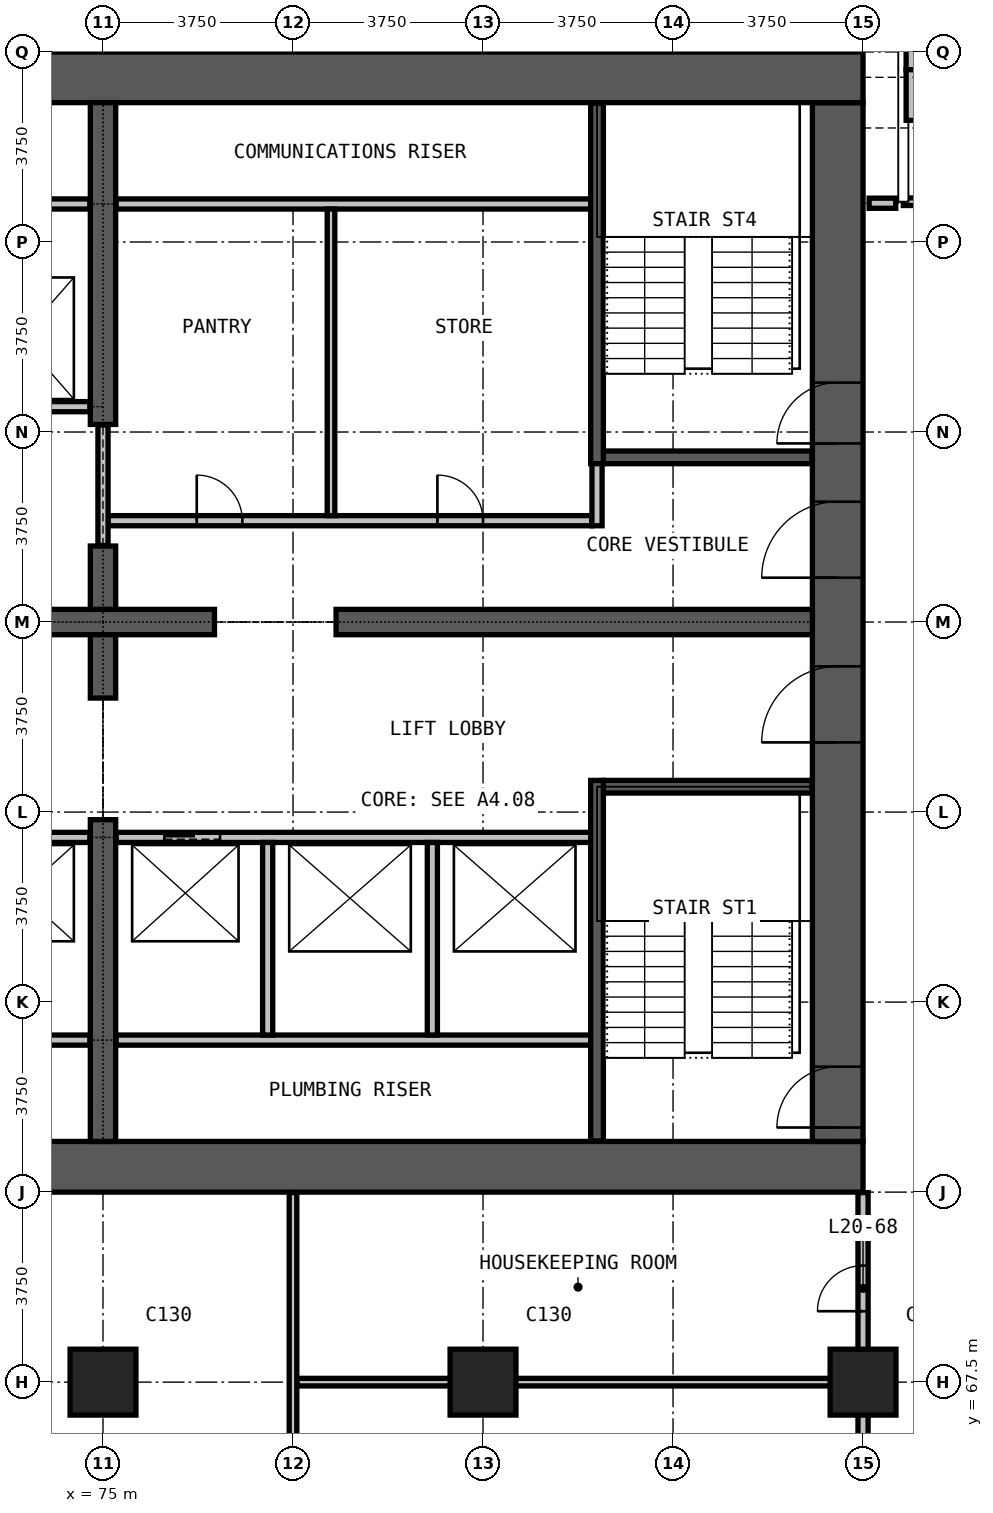
"""IFC4 building model, lengths in metres.
Left out: names, types, materials, properties, quantities, classifications, styles, units other than length and angle.
Written with IfcOpenShell. Run it as: python <this file> out.ifc"""

import sys

from ifc_helpers import new_model, si_unit, direction, frame, frame_2d, origin, origin_2d, place, context, subcontext, project, spatial, rectangle, extrude, element, fill, save


model = new_model("IFC4")
c1 = context("Model", 3, precision=1e-05, world=origin(), true_north=direction((0.0, 1.0)))
c2 = subcontext(c1, "Body", "Model", "MODEL_VIEW")
j1 = project(units=[si_unit("LENGTHUNIT", "METRE"), si_unit("PLANEANGLEUNIT", "RADIAN")], contexts=[c1])
p1 = place(None, origin())
s1 = spatial("IfcSite", under=j1, at=p1, CompositionType="ELEMENT")
p2 = place(p1, origin())
s2 = spatial("IfcBuilding", under=s1, at=p2, CompositionType="ELEMENT")
p3 = place(p2, frame((0.0, 0.0, 85.7)))
s3 = spatial("IfcBuildingStorey", under=s2, at=p3, CompositionType="ELEMENT", Elevation=85.7)
for number, where, z_axis, x_axis in (
    (1, (75.0, 67.5, 0.0), (0.0, 0.0, 1.0), (1.0, 0.0, 0.0)),
    (2, (82.5, 67.5, 0.0), (0.0, 0.0, 1.0), (1.0, 0.0, 0.0)),
    (3, (90.0, 67.5, 0.0), (0.0, 0.0, 1.0), (1.0, 0.0, 0.0)),
):
    element("IfcColumn", number, at=place(p3, frame(where, z_axis=z_axis, x_axis=x_axis)), inside=s3, PredefinedType="COLUMN", context=c2, shape_type="SweptSolid", body=[
        extrude(rectangle(XDim=1.3, YDim=1.3, at=origin_2d()), origin(), (0.0, 0.0, 1.0), 3.3),
    ])
p4 = place(p3, frame((60.0, 71.75, 0.0), z_axis=(0.0, 0.0, 1.0), x_axis=(1.0, 0.0, 0.0)))
e4 = element("IfcWall", 4, at=p4, inside=s3, PredefinedType="SHEAR", context=c2, shape_type="SweptSolid", body=[
    extrude(rectangle(XDim=30.0, YDim=1.0, at=frame_2d((15.0, 0.0))), origin(), (0.0, 0.0, 1.0), 3.3),
])
p5 = place(p3, frame((89.5, 72.25, 0.0), z_axis=(0.0, 0.0, 1.0), x_axis=(0.0, 1.0, 0.0)))
e5 = element("IfcWall", 5, at=p5, inside=s3, PredefinedType="SHEAR", context=c2, shape_type="SweptSolid", body=[
    extrude(rectangle(XDim=20.5, YDim=1.0, at=frame_2d((10.25, 0.0))), origin(), (0.0, 0.0, 1.0), 3.3),
])
p6 = place(p5, frame((0.275, 0.0, 0.0)))
e6 = element("IfcOpeningElement", 6, at=p6, cuts=e5, PredefinedType="OPENING", context=c2, shape_type="SweptSolid", body=[
    extrude(rectangle(XDim=1.2, YDim=2.2, at=frame_2d((0.6, 1.1))), frame((0.0, 0.51, 0.0), z_axis=(0.0, -1.0, 0.0), x_axis=(1.0, 0.0, 0.0)), (0.0, 0.0, 1.0), 1.02),
])
p7 = place(p5, frame((13.775, 0.0, 0.0)))
e7 = element("IfcOpeningElement", 7, at=p7, cuts=e5, PredefinedType="OPENING", context=c2, shape_type="SweptSolid", body=[
    extrude(rectangle(XDim=1.2, YDim=2.2, at=frame_2d((0.6, 1.1))), frame((0.0, 0.51, 0.0), z_axis=(0.0, -1.0, 0.0), x_axis=(1.0, 0.0, 0.0)), (0.0, 0.0, 1.0), 1.02),
])
p8 = place(p5, frame((7.875, 0.0, 0.0)))
e8 = element("IfcOpeningElement", 8, at=p8, cuts=e5, PredefinedType="OPENING", context=c2, shape_type="SweptSolid", body=[
    extrude(rectangle(XDim=1.5, YDim=2.2, at=frame_2d((0.75, 1.1))), frame((0.0, 0.51, 0.0), z_axis=(0.0, -1.0, 0.0), x_axis=(1.0, 0.0, 0.0)), (0.0, 0.0, 1.0), 1.02),
])
p9 = place(p5, frame((11.125, 0.0, 0.0)))
e9 = element("IfcOpeningElement", 9, at=p9, cuts=e5, PredefinedType="OPENING", context=c2, shape_type="SweptSolid", body=[
    extrude(rectangle(XDim=1.5, YDim=2.2, at=frame_2d((0.75, 1.1))), frame((0.0, 0.51, 0.0), z_axis=(0.0, -1.0, 0.0), x_axis=(1.0, 0.0, 0.0)), (0.0, 0.0, 1.0), 1.02),
])
p10 = place(p3, frame((90.0, 93.25, 0.0), z_axis=(0.0, 0.0, 1.0), x_axis=(-1.0, 0.0, 0.0)))
e10 = element("IfcWall", 10, at=p10, inside=s3, PredefinedType="SHEAR", context=c2, shape_type="SweptSolid", body=[
    extrude(rectangle(XDim=30.0, YDim=1.0, at=frame_2d((15.0, 0.0))), origin(), (0.0, 0.0, 1.0), 3.3),
])
p11 = place(p3, frame((72.8, 82.5, 0.0), z_axis=(0.0, 0.0, 1.0), x_axis=(1.0, 0.0, 0.0)))
e11 = element("IfcWall", 11, at=p11, inside=s3, PredefinedType="SHEAR", context=c2, shape_type="SweptSolid", body=[
    extrude(rectangle(XDim=4.4, YDim=0.5, at=frame_2d((2.2, 0.0))), origin(), (0.0, 0.0, 1.0), 3.3),
])
p12 = place(p3, frame((79.6, 82.5, 0.0), z_axis=(0.0, 0.0, 1.0), x_axis=(1.0, 0.0, 0.0)))
e12 = element("IfcWall", 12, at=p12, inside=s3, PredefinedType="SHEAR", context=c2, shape_type="SweptSolid", body=[
    extrude(rectangle(XDim=9.4, YDim=0.5, at=frame_2d((4.7, 0.0))), origin(), (0.0, 0.0, 1.0), 3.3),
])
p13 = place(p3, frame((75.0, 72.25, 0.0), z_axis=(0.0, 0.0, 1.0), x_axis=(0.0, 1.0, 0.0)))
e13 = element("IfcWall", 13, at=p13, inside=s3, PredefinedType="SHEAR", context=c2, shape_type="SweptSolid", body=[
    extrude(rectangle(XDim=6.35, YDim=0.5, at=frame_2d((3.175, 0.0))), origin(), (0.0, 0.0, 1.0), 3.3),
])
for number, where, z_axis, x_axis in (
    (14, (75.0, 81.0, 0.0), (0.0, 0.0, 1.0), (0.0, 1.0, 0.0)),
    (15, (75.0, 82.75, 0.0), (0.0, 0.0, 1.0), (0.0, 1.0, 0.0)),
):
    element("IfcWall", number, at=place(p3, frame(where, z_axis=z_axis, x_axis=x_axis)), inside=s3, PredefinedType="SHEAR", context=c2, shape_type="SweptSolid", body=[
        extrude(rectangle(XDim=1.25, YDim=0.5, at=frame_2d((0.625, 0.0))), origin(), (0.0, 0.0, 1.0), 3.3),
    ])
p14 = place(p3, frame((75.0, 86.4, 0.0), z_axis=(0.0, 0.0, 1.0), x_axis=(0.0, 1.0, 0.0)))
e16 = element("IfcWall", 16, at=p14, inside=s3, PredefinedType="SHEAR", context=c2, shape_type="SweptSolid", body=[
    extrude(rectangle(XDim=6.35, YDim=0.5, at=frame_2d((3.175, 0.0))), origin(), (0.0, 0.0, 1.0), 3.3),
])
p15 = place(p3, frame((90.795, 90.795, 0.0), z_axis=(0.0, 0.0, 1.0), x_axis=(1.0, 0.0, 0.0)))
e17 = element("IfcWall", 17, at=p15, inside=s3, PredefinedType="SOLIDWALL", context=c2, shape_type="SweptSolid", body=[
    extrude(rectangle(XDim=2.955, YDim=0.15, at=frame_2d((1.478, 0.0))), origin(), (0.0, 0.0, 1.0), 3.0),
])
p16 = place(p15, frame((0.877, 0.0, 0.0)))
e18 = element("IfcOpeningElement", 18, at=p16, cuts=e17, PredefinedType="OPENING", context=c2, shape_type="SweptSolid", body=[
    extrude(rectangle(XDim=1.2, YDim=2.4, at=frame_2d((0.6, 1.2))), frame((0.0, 0.085, 0.0), z_axis=(0.0, -1.0, 0.0), x_axis=(1.0, 0.0, 0.0)), (0.0, 0.0, 1.0), 0.17),
])
p17 = place(p3, frame((90.85, 93.625, 0.0), z_axis=(0.0, 0.0, 1.0), x_axis=(1.0, 0.0, 0.0)))
e19 = element("IfcWall", 19, at=p17, inside=s3, PredefinedType="USERDEFINED", context=c2, shape_type="SweptSolid", body=[
    extrude(rectangle(XDim=3.2, YDim=0.45, at=frame_2d((1.6, 0.0))), origin(), (0.0, 0.0, 1.0), 1.1),
])
p18 = place(p3, frame((91.075, 92.4, 0.0), z_axis=(0.0, 0.0, 1.0), x_axis=(0.0, 1.0, 0.0)))
e20 = element("IfcWall", 20, at=p18, inside=s3, PredefinedType="USERDEFINED", context=c2, shape_type="SweptSolid", body=[
    extrude(rectangle(XDim=1.0, YDim=0.45, at=frame_2d((0.5, 0.0))), origin(), (0.0, 0.0, 1.0), 1.1),
])
p19 = place(p3, frame((75.1, 84.5, 0.0), z_axis=(0.0, 0.0, 1.0), x_axis=(1.0, 0.0, 0.0)))
e21 = element("IfcWall", 21, at=p19, inside=s3, PredefinedType="PARTITIONING", context=c2, shape_type="SweptSolid", body=[
    extrude(rectangle(XDim=9.55, YDim=0.2, at=frame_2d((4.775, 0.0))), origin(), (0.0, 0.0, 1.0), 3.0),
])
p20 = place(p19, frame((1.75, 0.0, 0.0)))
e22 = element("IfcOpeningElement", 22, at=p20, cuts=e21, PredefinedType="OPENING", context=c2, shape_type="SweptSolid", body=[
    extrude(rectangle(XDim=0.9, YDim=2.2, at=frame_2d((0.45, 1.1))), frame((0.0, 0.11, 0.0), z_axis=(0.0, -1.0, 0.0), x_axis=(1.0, 0.0, 0.0)), (0.0, 0.0, 1.0), 0.22),
])
p21 = place(p19, frame((6.5, 0.0, 0.0)))
e23 = element("IfcOpeningElement", 23, at=p21, cuts=e21, PredefinedType="OPENING", context=c2, shape_type="SweptSolid", body=[
    extrude(rectangle(XDim=0.9, YDim=2.2, at=frame_2d((0.45, 1.1))), frame((0.0, 0.11, 0.0), z_axis=(0.0, -1.0, 0.0), x_axis=(1.0, 0.0, 0.0)), (0.0, 0.0, 1.0), 0.22),
])
p22 = place(p3, frame((75.26, 90.75, 0.0), z_axis=(0.0, 0.0, 1.0), x_axis=(1.0, 0.0, 0.0)))
e24 = element("IfcWall", 24, at=p22, inside=s3, PredefinedType="PARTITIONING", context=c2, shape_type="SweptSolid", body=[
    extrude(rectangle(XDim=9.365, YDim=0.2, at=frame_2d((4.683, 0.0))), origin(), (0.0, 0.0, 1.0), 3.0),
])
p23 = place(p3, frame((75.0, 84.01, 0.0), z_axis=(0.0, 0.0, 1.0), x_axis=(0.0, 1.0, 0.0)))
e25 = element("IfcWall", 25, at=p23, inside=s3, PredefinedType="PARTITIONING", context=c2, shape_type="SweptSolid", body=[
    extrude(rectangle(XDim=2.38, YDim=0.2, at=frame_2d((1.19, 0.0))), origin(), (0.0, 0.0, 1.0), 2.4),
])
p24 = place(p3, frame((84.75, 84.4, 0.0), z_axis=(0.0, 0.0, 1.0), x_axis=(0.0, 1.0, 0.0)))
e26 = element("IfcWall", 26, at=p24, inside=s3, PredefinedType="PARTITIONING", context=c2, shape_type="SweptSolid", body=[
    extrude(rectangle(XDim=1.475, YDim=0.2, at=frame_2d((0.738, 0.0))), origin(), (0.0, 0.0, 1.0), 3.0),
])
p25 = place(p3, frame((90.12, 90.765, 0.0), z_axis=(0.0, 0.0, 1.0), x_axis=(1.0, 0.0, 0.0)))
e27 = element("IfcWall", 27, at=p25, inside=s3, PredefinedType="PARTITIONING", context=c2, shape_type="SweptSolid", body=[
    extrude(rectangle(XDim=0.525, YDim=0.2, at=frame_2d((0.262, 0.0))), origin(), (0.0, 0.0, 1.0), 3.0),
])
p26 = place(p3, frame((90.0, 52.4, 0.0), z_axis=(0.0, 0.0, 1.0), x_axis=(0.0, 1.0, 0.0)))
e28 = element("IfcWall", 28, at=p26, inside=s3, PredefinedType="PARTITIONING", context=c2, shape_type="SweptSolid", body=[
    extrude(rectangle(XDim=18.84, YDim=0.2, at=frame_2d((9.42, 0.0))), origin(), (0.0, 0.0, 1.0), 3.0),
])
p27 = place(p26, frame((10.85, 0.0, 0.0)))
e29 = element("IfcOpeningElement", 29, at=p27, cuts=e28, PredefinedType="OPENING", context=c2, shape_type="SweptSolid", body=[
    extrude(rectangle(XDim=1.0, YDim=2.2, at=frame_2d((0.5, 1.1))), frame((0.0, 0.11, 0.0), z_axis=(0.0, -1.0, 0.0), x_axis=(1.0, 0.0, 0.0)), (0.0, 0.0, 1.0), 0.22),
])
p28 = place(p26, frame((16.5, 0.0, 0.0)))
e30 = element("IfcOpeningElement", 30, at=p28, cuts=e28, PredefinedType="OPENING", context=c2, shape_type="SweptSolid", body=[
    extrude(rectangle(XDim=0.9, YDim=2.2, at=frame_2d((0.45, 1.1))), frame((0.0, 0.11, 0.0), z_axis=(0.0, -1.0, 0.0), x_axis=(1.0, 0.0, 0.0)), (0.0, 0.0, 1.0), 0.22),
])
p29 = place(p3, frame((78.825, 67.5, 0.0), z_axis=(0.0, 0.0, 1.0), x_axis=(1.0, 0.0, 0.0)))
e31 = element("IfcWall", 31, at=p29, inside=s3, PredefinedType="PARTITIONING", context=c2, shape_type="SweptSolid", body=[
    extrude(rectangle(XDim=11.075, YDim=0.15, at=frame_2d((5.538, 0.0))), origin(), (0.0, 0.0, 1.0), 3.0),
])
p30 = place(p3, frame((78.75, 52.6, 0.0), z_axis=(0.0, 0.0, 1.0), x_axis=(0.0, 1.0, 0.0)))
e32 = element("IfcWall", 32, at=p30, inside=s3, PredefinedType="PARTITIONING", context=c2, shape_type="SweptSolid", body=[
    extrude(rectangle(XDim=18.64, YDim=0.15, at=frame_2d((9.32, 0.0))), origin(), (0.0, 0.0, 1.0), 3.0),
])
p31 = place(p3, frame((79.5, 84.6, 0.0), z_axis=(0.0, 0.0, 1.0), x_axis=(0.0, 1.0, 0.0)))
e33 = element("IfcWall", 33, at=p31, inside=s3, PredefinedType="PARTITIONING", context=c2, shape_type="SweptSolid", body=[
    extrude(rectangle(XDim=6.05, YDim=0.15, at=frame_2d((3.025, 0.0))), origin(), (0.0, 0.0, 1.0), 3.0),
])
for number, where, z_axis, x_axis in (
    (34, (65.375, 74.25, 0.0), (0.0, 0.0, 1.0), (1.0, 0.0, 0.0)),
    (35, (75.26, 74.25, 0.0), (0.0, 0.0, 1.0), (1.0, 0.0, 0.0)),
):
    element("IfcWall", number, at=place(p3, frame(where, z_axis=z_axis, x_axis=x_axis)), inside=s3, PredefinedType="PARTITIONING", context=c2, shape_type="SweptSolid", body=[
        extrude(rectangle(XDim=9.365, YDim=0.2, at=frame_2d((4.683, 0.0))), origin(), (0.0, 0.0, 1.0), 3.0),
    ])
p32 = place(p3, frame((65.375, 78.25, 0.0), z_axis=(0.0, 0.0, 1.0), x_axis=(1.0, 0.0, 0.0)))
e36 = element("IfcWall", 36, at=p32, inside=s3, PredefinedType="PARTITIONING", context=c2, shape_type="SweptSolid", body=[
    extrude(rectangle(XDim=9.365, YDim=0.2, at=frame_2d((4.683, 0.0))), origin(), (0.0, 0.0, 1.0), 3.0),
])
p33 = place(p32, frame((1.0, 0.0, 0.0)))
e37 = element("IfcOpeningElement", 37, at=p33, cuts=e36, PredefinedType="OPENING", context=c2, shape_type="SweptSolid", body=[
    extrude(rectangle(XDim=1.1, YDim=2.2, at=frame_2d((0.55, 1.1))), frame((0.0, 0.11, 0.0), z_axis=(0.0, -1.0, 0.0), x_axis=(1.0, 0.0, 0.0)), (0.0, 0.0, 1.0), 0.22),
])
p34 = place(p32, frame((4.175, 0.0, 0.0)))
e38 = element("IfcOpeningElement", 38, at=p34, cuts=e36, PredefinedType="OPENING", context=c2, shape_type="SweptSolid", body=[
    extrude(rectangle(XDim=1.1, YDim=2.2, at=frame_2d((0.55, 1.1))), frame((0.0, 0.11, 0.0), z_axis=(0.0, -1.0, 0.0), x_axis=(1.0, 0.0, 0.0)), (0.0, 0.0, 1.0), 0.22),
])
p35 = place(p32, frame((7.325, 0.0, 0.0)))
e39 = element("IfcOpeningElement", 39, at=p35, cuts=e36, PredefinedType="OPENING", context=c2, shape_type="SweptSolid", body=[
    extrude(rectangle(XDim=1.1, YDim=2.2, at=frame_2d((0.55, 1.1))), frame((0.0, 0.11, 0.0), z_axis=(0.0, -1.0, 0.0), x_axis=(1.0, 0.0, 0.0)), (0.0, 0.0, 1.0), 0.22),
])
p36 = place(p3, frame((75.26, 78.25, 0.0), z_axis=(0.0, 0.0, 1.0), x_axis=(1.0, 0.0, 0.0)))
e40 = element("IfcWall", 40, at=p36, inside=s3, PredefinedType="PARTITIONING", context=c2, shape_type="SweptSolid", body=[
    extrude(rectangle(XDim=9.365, YDim=0.2, at=frame_2d((4.683, 0.0))), origin(), (0.0, 0.0, 1.0), 3.0),
])
p37 = place(p36, frame((0.95, 0.0, 0.0)))
e41 = element("IfcOpeningElement", 41, at=p37, cuts=e40, PredefinedType="OPENING", context=c2, shape_type="SweptSolid", body=[
    extrude(rectangle(XDim=1.1, YDim=2.2, at=frame_2d((0.55, 1.1))), frame((0.0, 0.11, 0.0), z_axis=(0.0, -1.0, 0.0), x_axis=(1.0, 0.0, 0.0)), (0.0, 0.0, 1.0), 0.22),
])
p38 = place(p3, frame((65.375, 86.75, 0.0), z_axis=(0.0, 0.0, 1.0), x_axis=(1.0, 0.0, 0.0)))
e42 = element("IfcWall", 42, at=p38, inside=s3, PredefinedType="PARTITIONING", context=c2, shape_type="SweptSolid", body=[
    extrude(rectangle(XDim=9.365, YDim=0.2, at=frame_2d((4.683, 0.0))), origin(), (0.0, 0.0, 1.0), 3.0),
])
p39 = place(p38, frame((1.0, 0.0, 0.0)))
e43 = element("IfcOpeningElement", 43, at=p39, cuts=e42, PredefinedType="OPENING", context=c2, shape_type="SweptSolid", body=[
    extrude(rectangle(XDim=1.1, YDim=2.2, at=frame_2d((0.55, 1.1))), frame((0.0, 0.11, 0.0), z_axis=(0.0, -1.0, 0.0), x_axis=(1.0, 0.0, 0.0)), (0.0, 0.0, 1.0), 0.22),
])
p40 = place(p38, frame((4.175, 0.0, 0.0)))
e44 = element("IfcOpeningElement", 44, at=p40, cuts=e42, PredefinedType="OPENING", context=c2, shape_type="SweptSolid", body=[
    extrude(rectangle(XDim=1.1, YDim=2.2, at=frame_2d((0.55, 1.1))), frame((0.0, 0.11, 0.0), z_axis=(0.0, -1.0, 0.0), x_axis=(1.0, 0.0, 0.0)), (0.0, 0.0, 1.0), 0.22),
])
p41 = place(p38, frame((7.325, 0.0, 0.0)))
e45 = element("IfcOpeningElement", 45, at=p41, cuts=e42, PredefinedType="OPENING", context=c2, shape_type="SweptSolid", body=[
    extrude(rectangle(XDim=1.1, YDim=2.2, at=frame_2d((0.55, 1.1))), frame((0.0, 0.11, 0.0), z_axis=(0.0, -1.0, 0.0), x_axis=(1.0, 0.0, 0.0)), (0.0, 0.0, 1.0), 0.22),
])
p42 = place(p3, frame((65.375, 90.75, 0.0), z_axis=(0.0, 0.0, 1.0), x_axis=(1.0, 0.0, 0.0)))
e46 = element("IfcWall", 46, at=p42, inside=s3, PredefinedType="PARTITIONING", context=c2, shape_type="SweptSolid", body=[
    extrude(rectangle(XDim=9.365, YDim=0.2, at=frame_2d((4.683, 0.0))), origin(), (0.0, 0.0, 1.0), 3.0),
])
for number, where, z_axis, x_axis in (
    (47, (78.25, 74.35, 0.0), (0.0, 0.0, 1.0), (0.0, 1.0, 0.0)),
    (48, (81.5, 74.35, 0.0), (0.0, 0.0, 1.0), (0.0, 1.0, 0.0)),
):
    element("IfcWall", number, at=place(p3, frame(where, z_axis=z_axis, x_axis=x_axis)), inside=s3, PredefinedType="PARTITIONING", context=c2, shape_type="SweptSolid", body=[
        extrude(rectangle(XDim=3.8, YDim=0.2, at=frame_2d((1.9, 0.0))), origin(), (0.0, 0.0, 1.0), 3.0),
    ])
for number, where, z_axis, x_axis in (
    (49, (84.875, 79.25, 0.0), (0.0, 0.0, 1.0), (1.0, 0.0, 0.0)),
    (50, (84.875, 85.75, 0.0), (0.0, 0.0, 1.0), (1.0, 0.0, 0.0)),
):
    element("IfcWall", number, at=place(p3, frame(where, z_axis=z_axis, x_axis=x_axis)), inside=s3, PredefinedType="PARTITIONING", context=c2, shape_type="SweptSolid", body=[
        extrude(rectangle(XDim=4.115, YDim=0.25, at=frame_2d((2.058, 0.0))), origin(), (0.0, 0.0, 1.0), 3.0),
    ])
for number, where, z_axis, x_axis in (
    (51, (84.75, 72.26, 0.0), (0.0, 0.0, 1.0), (0.0, 1.0, 0.0)),
    (52, (84.75, 85.625, 0.0), (0.0, 0.0, 1.0), (0.0, 1.0, 0.0)),
):
    element("IfcWall", number, at=place(p3, frame(where, z_axis=z_axis, x_axis=x_axis)), inside=s3, PredefinedType="PARTITIONING", context=c2, shape_type="SweptSolid", body=[
        extrude(rectangle(XDim=7.115, YDim=0.25, at=frame_2d((3.558, 0.0))), origin(), (0.0, 0.0, 1.0), 3.0),
    ])
p43 = place(p37, origin())
e53 = element("IfcDoor", 53, at=p43, inside=s3, OperationType="DOUBLE_DOOR_SLIDING", PredefinedType="DOOR", context=c2, shape_type="SweptSolid", body=[
    extrude(rectangle(XDim=1.1, YDim=2.2, at=frame_2d((0.55, 1.1))), frame((0.0, 0.025, 0.0), z_axis=(0.0, -1.0, 0.0), x_axis=(1.0, 0.0, 0.0)), (0.0, 0.0, 1.0), 0.05),
])
fill(e41, e53)
p44 = place(p6, origin())
e54 = element("IfcDoor", 54, at=p44, inside=s3, OperationType="SINGLE_SWING_RIGHT", PredefinedType="DOOR", context=c2, shape_type="SweptSolid", body=[
    extrude(rectangle(XDim=1.2, YDim=2.2, at=frame_2d((0.6, 1.1))), frame((0.0, 0.025, 0.0), z_axis=(0.0, -1.0, 0.0), x_axis=(1.0, 0.0, 0.0)), (0.0, 0.0, 1.0), 0.05),
])
fill(e6, e54)
p45 = place(p7, origin())
e55 = element("IfcDoor", 55, at=p45, inside=s3, OperationType="SINGLE_SWING_LEFT", PredefinedType="DOOR", context=c2, shape_type="SweptSolid", body=[
    extrude(rectangle(XDim=1.2, YDim=2.2, at=frame_2d((0.6, 1.1))), frame((0.0, 0.025, 0.0), z_axis=(0.0, -1.0, 0.0), x_axis=(1.0, 0.0, 0.0)), (0.0, 0.0, 1.0), 0.05),
])
fill(e7, e55)
p46 = place(p8, origin())
e56 = element("IfcDoor", 56, at=p46, inside=s3, OperationType="DOUBLE_DOOR_SINGLE_SWING", PredefinedType="DOOR", context=c2, shape_type="SweptSolid", body=[
    extrude(rectangle(XDim=1.5, YDim=2.2, at=frame_2d((0.75, 1.1))), frame((0.0, 0.025, 0.0), z_axis=(0.0, -1.0, 0.0), x_axis=(1.0, 0.0, 0.0)), (0.0, 0.0, 1.0), 0.05),
])
fill(e8, e56)
p47 = place(p9, origin())
e57 = element("IfcDoor", 57, at=p47, inside=s3, OperationType="DOUBLE_DOOR_SINGLE_SWING", PredefinedType="DOOR", context=c2, shape_type="SweptSolid", body=[
    extrude(rectangle(XDim=1.5, YDim=2.2, at=frame_2d((0.75, 1.1))), frame((0.0, 0.025, 0.0), z_axis=(0.0, -1.0, 0.0), x_axis=(1.0, 0.0, 0.0)), (0.0, 0.0, 1.0), 0.05),
])
fill(e9, e57)
p48 = place(p20, origin())
e58 = element("IfcDoor", 58, at=p48, inside=s3, OperationType="SINGLE_SWING_RIGHT", PredefinedType="DOOR", context=c2, shape_type="SweptSolid", body=[
    extrude(rectangle(XDim=0.9, YDim=2.2, at=frame_2d((0.45, 1.1))), frame((0.0, 0.025, 0.0), z_axis=(0.0, -1.0, 0.0), x_axis=(1.0, 0.0, 0.0)), (0.0, 0.0, 1.0), 0.05),
])
fill(e22, e58)
p49 = place(p21, origin())
e59 = element("IfcDoor", 59, at=p49, inside=s3, OperationType="SINGLE_SWING_LEFT", PredefinedType="DOOR", context=c2, shape_type="SweptSolid", body=[
    extrude(rectangle(XDim=0.9, YDim=2.2, at=frame_2d((0.45, 1.1))), frame((0.0, 0.025, 0.0), z_axis=(0.0, -1.0, 0.0), x_axis=(1.0, 0.0, 0.0)), (0.0, 0.0, 1.0), 0.05),
])
fill(e23, e59)
p50 = place(p28, origin())
e60 = element("IfcDoor", 60, at=p50, inside=s3, OperationType="SINGLE_SWING_LEFT", PredefinedType="DOOR", context=c2, shape_type="SweptSolid", body=[
    extrude(rectangle(XDim=0.9, YDim=2.2, at=frame_2d((0.45, 1.1))), frame((0.0, 0.025, 0.0), z_axis=(0.0, -1.0, 0.0), x_axis=(1.0, 0.0, 0.0)), (0.0, 0.0, 1.0), 0.05),
])
fill(e30, e60)
save(model, sys.argv[1])
